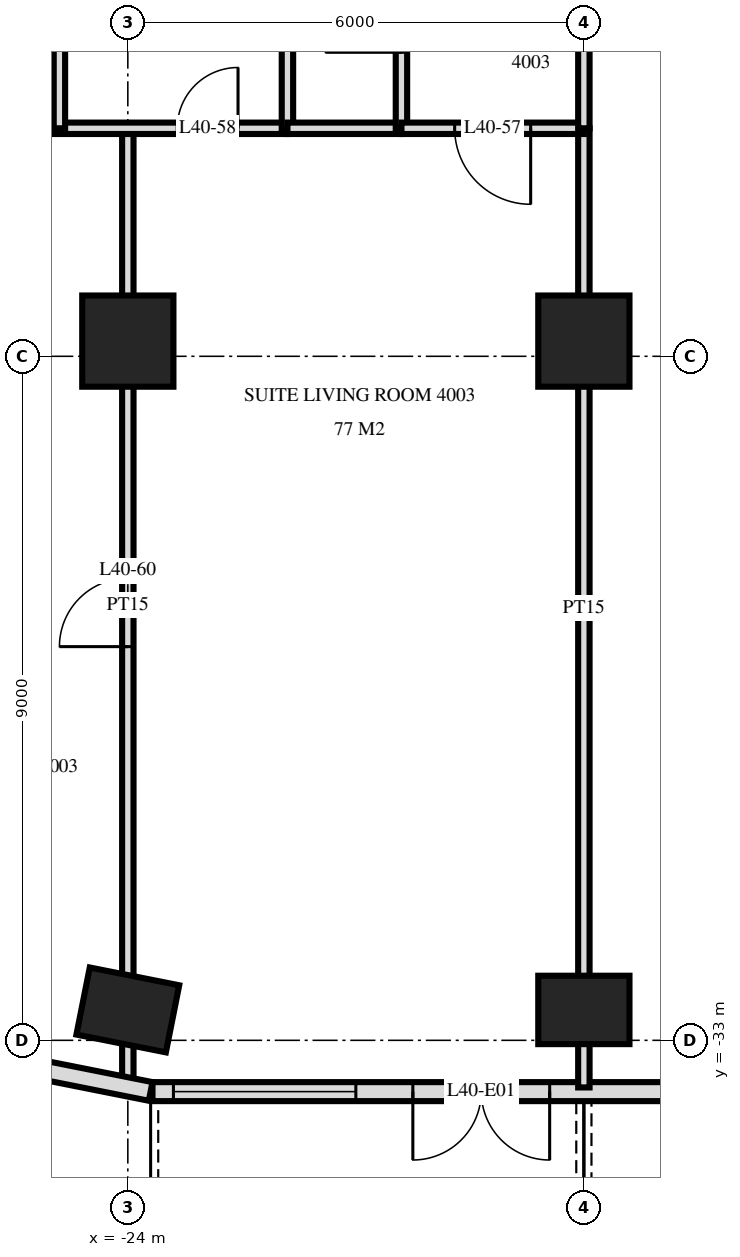
"""IFC4 building model, lengths in metres.
Left out: names, types, materials, properties, quantities, classifications, styles, units other than length and angle.
Written with IfcOpenShell. Run it as: python <this file> out.ifc"""

import sys

from ifc_helpers import new_model, si_unit, direction, frame, frame_2d, origin, origin_2d, place, context, subcontext, project, spatial, rectangle, extrude, element, fill, save


model = new_model("IFC4")
c1 = context("Model", 3, precision=1e-05, world=origin(), true_north=direction((0.0, 1.0)))
c2 = subcontext(c1, "Body", "Model", "MODEL_VIEW")
j1 = project(units=[si_unit("LENGTHUNIT", "METRE"), si_unit("PLANEANGLEUNIT", "RADIAN")], contexts=[c1])
p1 = place(None, origin())
s1 = spatial("IfcSite", under=j1, at=p1, CompositionType="ELEMENT")
p2 = place(p1, origin())
s2 = spatial("IfcBuilding", under=s1, at=p2, CompositionType="ELEMENT")
p3 = place(p2, frame((0.0, 0.0, 156.0)))
s3 = spatial("IfcBuildingStorey", under=s2, at=p3, CompositionType="ELEMENT", Elevation=156.0)
p4 = place(p3, frame((-24.0, -32.6, 0.0), z_axis=(0.0, 0.0, 1.0), x_axis=(-0.980792089743, 0.195056086032, 0.0)))
e1 = element("IfcColumn", 1, at=p4, inside=s3, PredefinedType="COLUMN", context=c2, shape_type="SweptSolid", body=[
    extrude(rectangle(XDim=1.2, YDim=0.9, at=origin_2d()), origin(), (0.0, 0.0, 1.0), 3.6),
])
p5 = place(p3, frame((-24.0, -23.8, 0.0), z_axis=(0.0, 0.0, 1.0), x_axis=(1.0, 0.0, 0.0)))
e2 = element("IfcColumn", 2, at=p5, inside=s3, PredefinedType="COLUMN", context=c2, shape_type="SweptSolid", body=[
    extrude(rectangle(XDim=1.2, YDim=1.2, at=origin_2d()), origin(), (0.0, 0.0, 1.0), 3.6),
])
p6 = place(p3, frame((-18.0, -32.6, 0.0), z_axis=(0.0, 0.0, 1.0), x_axis=(1.0, 0.0, 0.0)))
e3 = element("IfcColumn", 3, at=p6, inside=s3, PredefinedType="COLUMN", context=c2, shape_type="SweptSolid", body=[
    extrude(rectangle(XDim=1.2, YDim=0.9, at=origin_2d()), origin(), (0.0, 0.0, 1.0), 3.6),
])
p7 = place(p3, frame((-18.0, -23.8, 0.0), z_axis=(0.0, 0.0, 1.0), x_axis=(1.0, 0.0, 0.0)))
e4 = element("IfcColumn", 4, at=p7, inside=s3, PredefinedType="COLUMN", context=c2, shape_type="SweptSolid", body=[
    extrude(rectangle(XDim=1.2, YDim=1.2, at=origin_2d()), origin(), (0.0, 0.0, 1.0), 3.6),
])
p8 = place(p3, frame((-25.349, -33.344, 0.0), z_axis=(0.0, 0.0, 1.0), x_axis=(0.980775640221, -0.19513878023, 0.0)))
e5 = element("IfcWall", 5, at=p8, inside=s3, PredefinedType="SOLIDWALL", context=c2, shape_type="SweptSolid", body=[
    extrude(rectangle(XDim=1.681, YDim=0.25, at=frame_2d((0.841, 0.0))), origin(), (0.0, 0.0, 1.0), 3.32),
])
p9 = place(p3, frame((-23.675, -33.675, 0.0), z_axis=(0.0, 0.0, 1.0), x_axis=(1.0, 0.0, 0.0)))
e6 = element("IfcWall", 6, at=p9, inside=s3, PredefinedType="SOLIDWALL", context=c2, shape_type="SweptSolid", body=[
    extrude(rectangle(XDim=47.351, YDim=0.25, at=frame_2d((23.675, 0.0))), origin(), (0.0, 0.0, 1.0), 3.32),
])
p10 = place(p9, frame((0.275, 0.0, 0.3)))
e7 = element("IfcOpeningElement", 7, at=p10, cuts=e6, PredefinedType="OPENING", context=c2, shape_type="SweptSolid", body=[
    extrude(rectangle(XDim=2.4, YDim=2.1, at=frame_2d((1.2, 1.05))), frame((0.0, 0.135, 0.0), z_axis=(0.0, -1.0, 0.0), x_axis=(1.0, 0.0, 0.0)), (0.0, 0.0, 1.0), 0.27),
])
p11 = place(p9, frame((3.425, 0.0, 0.0)))
e8 = element("IfcOpeningElement", 8, at=p11, cuts=e6, PredefinedType="OPENING", context=c2, shape_type="SweptSolid", body=[
    extrude(rectangle(XDim=1.8, YDim=2.4, at=frame_2d((0.9, 1.2))), frame((0.0, 0.135, 0.0), z_axis=(0.0, -1.0, 0.0), x_axis=(1.0, 0.0, 0.0)), (0.0, 0.0, 1.0), 0.27),
])
p12 = place(p9, frame((7.775, 0.0, 0.0)))
e9 = element("IfcOpeningElement", 9, at=p12, cuts=e6, PredefinedType="OPENING", context=c2, shape_type="SweptSolid", body=[
    extrude(rectangle(XDim=1.8, YDim=2.4, at=frame_2d((0.9, 1.2))), frame((0.0, 0.135, 0.0), z_axis=(0.0, -1.0, 0.0), x_axis=(1.0, 0.0, 0.0)), (0.0, 0.0, 1.0), 0.27),
])
p13 = place(p9, frame((12.275, 0.0, 0.0)))
e10 = element("IfcOpeningElement", 10, at=p13, cuts=e6, PredefinedType="OPENING", context=c2, shape_type="SweptSolid", body=[
    extrude(rectangle(XDim=1.8, YDim=2.4, at=frame_2d((0.9, 1.2))), frame((0.0, 0.135, 0.0), z_axis=(0.0, -1.0, 0.0), x_axis=(1.0, 0.0, 0.0)), (0.0, 0.0, 1.0), 0.27),
])
p14 = place(p9, frame((14.975, 0.0, 0.3)))
e11 = element("IfcOpeningElement", 11, at=p14, cuts=e6, PredefinedType="OPENING", context=c2, shape_type="SweptSolid", body=[
    extrude(rectangle(XDim=2.4, YDim=2.1, at=frame_2d((1.2, 1.05))), frame((0.0, 0.135, 0.0), z_axis=(0.0, -1.0, 0.0), x_axis=(1.0, 0.0, 0.0)), (0.0, 0.0, 1.0), 0.27),
])
p15 = place(p9, frame((17.975, 0.0, 0.3)))
e12 = element("IfcOpeningElement", 12, at=p15, cuts=e6, PredefinedType="OPENING", context=c2, shape_type="SweptSolid", body=[
    extrude(rectangle(XDim=2.4, YDim=2.1, at=frame_2d((1.2, 1.05))), frame((0.0, 0.135, 0.0), z_axis=(0.0, -1.0, 0.0), x_axis=(1.0, 0.0, 0.0)), (0.0, 0.0, 1.0), 0.27),
])
p16 = place(p9, frame((21.275, 0.0, 0.0)))
e13 = element("IfcOpeningElement", 13, at=p16, cuts=e6, PredefinedType="OPENING", context=c2, shape_type="SweptSolid", body=[
    extrude(rectangle(XDim=1.8, YDim=2.4, at=frame_2d((0.9, 1.2))), frame((0.0, 0.135, 0.0), z_axis=(0.0, -1.0, 0.0), x_axis=(1.0, 0.0, 0.0)), (0.0, 0.0, 1.0), 0.27),
])
p17 = place(p9, frame((24.275, 0.0, 0.0)))
e14 = element("IfcOpeningElement", 14, at=p17, cuts=e6, PredefinedType="OPENING", context=c2, shape_type="SweptSolid", body=[
    extrude(rectangle(XDim=1.8, YDim=2.4, at=frame_2d((0.9, 1.2))), frame((0.0, 0.135, 0.0), z_axis=(0.0, -1.0, 0.0), x_axis=(1.0, 0.0, 0.0)), (0.0, 0.0, 1.0), 0.27),
])
p18 = place(p9, frame((26.975, 0.0, 0.3)))
e15 = element("IfcOpeningElement", 15, at=p18, cuts=e6, PredefinedType="OPENING", context=c2, shape_type="SweptSolid", body=[
    extrude(rectangle(XDim=2.4, YDim=2.1, at=frame_2d((1.2, 1.05))), frame((0.0, 0.135, 0.0), z_axis=(0.0, -1.0, 0.0), x_axis=(1.0, 0.0, 0.0)), (0.0, 0.0, 1.0), 0.27),
])
p19 = place(p9, frame((30.275, 0.0, 0.0)))
e16 = element("IfcOpeningElement", 16, at=p19, cuts=e6, PredefinedType="OPENING", context=c2, shape_type="SweptSolid", body=[
    extrude(rectangle(XDim=1.8, YDim=2.4, at=frame_2d((0.9, 1.2))), frame((0.0, 0.135, 0.0), z_axis=(0.0, -1.0, 0.0), x_axis=(1.0, 0.0, 0.0)), (0.0, 0.0, 1.0), 0.27),
])
p20 = place(p9, frame((32.975, 0.0, 0.3)))
e17 = element("IfcOpeningElement", 17, at=p20, cuts=e6, PredefinedType="OPENING", context=c2, shape_type="SweptSolid", body=[
    extrude(rectangle(XDim=2.4, YDim=2.1, at=frame_2d((1.2, 1.05))), frame((0.0, 0.135, 0.0), z_axis=(0.0, -1.0, 0.0), x_axis=(1.0, 0.0, 0.0)), (0.0, 0.0, 1.0), 0.27),
])
p21 = place(p9, frame((36.275, 0.0, 0.0)))
e18 = element("IfcOpeningElement", 18, at=p21, cuts=e6, PredefinedType="OPENING", context=c2, shape_type="SweptSolid", body=[
    extrude(rectangle(XDim=1.8, YDim=2.4, at=frame_2d((0.9, 1.2))), frame((0.0, 0.135, 0.0), z_axis=(0.0, -1.0, 0.0), x_axis=(1.0, 0.0, 0.0)), (0.0, 0.0, 1.0), 0.27),
])
p22 = place(p9, frame((38.975, 0.0, 0.3)))
e19 = element("IfcOpeningElement", 19, at=p22, cuts=e6, PredefinedType="OPENING", context=c2, shape_type="SweptSolid", body=[
    extrude(rectangle(XDim=2.4, YDim=2.1, at=frame_2d((1.2, 1.05))), frame((0.0, 0.135, 0.0), z_axis=(0.0, -1.0, 0.0), x_axis=(1.0, 0.0, 0.0)), (0.0, 0.0, 1.0), 0.27),
])
p23 = place(p9, frame((41.975, 0.0, 0.3)))
e20 = element("IfcOpeningElement", 20, at=p23, cuts=e6, PredefinedType="OPENING", context=c2, shape_type="SweptSolid", body=[
    extrude(rectangle(XDim=2.4, YDim=2.1, at=frame_2d((1.2, 1.05))), frame((0.0, 0.135, 0.0), z_axis=(0.0, -1.0, 0.0), x_axis=(1.0, 0.0, 0.0)), (0.0, 0.0, 1.0), 0.27),
])
p24 = place(p9, frame((45.125, 0.0, 0.0)))
e21 = element("IfcOpeningElement", 21, at=p24, cuts=e6, PredefinedType="OPENING", context=c2, shape_type="SweptSolid", body=[
    extrude(rectangle(XDim=1.8, YDim=2.4, at=frame_2d((0.9, 1.2))), frame((0.0, 0.135, 0.0), z_axis=(0.0, -1.0, 0.0), x_axis=(1.0, 0.0, 0.0)), (0.0, 0.0, 1.0), 0.27),
])
p25 = place(p3, frame((-18.0, -21.0, 0.0), z_axis=(0.0, 0.0, 1.0), x_axis=(0.0, 1.0, 0.0)))
e22 = element("IfcWall", 22, at=p25, inside=s3, PredefinedType="PARTITIONING", context=c2, shape_type="SweptSolid", body=[
    extrude(rectangle(XDim=3.0, YDim=0.15, at=frame_2d((1.5, 0.0))), origin(), (0.0, 0.0, 1.0), 3.32),
])
p26 = place(p3, frame((-18.0, -33.62, 0.0), z_axis=(0.0, 0.0, 1.0), x_axis=(0.0, 1.0, 0.0)))
e23 = element("IfcWall", 23, at=p26, inside=s3, PredefinedType="PARTITIONING", context=c2, shape_type="SweptSolid", body=[
    extrude(rectangle(XDim=12.62, YDim=0.15, at=frame_2d((6.31, 0.0))), origin(), (0.0, 0.0, 1.0), 3.32),
])
p27 = place(p3, frame((-20.4, -21.0, 0.0), z_axis=(0.0, 0.0, 1.0), x_axis=(0.0, 1.0, 0.0)))
e24 = element("IfcWall", 24, at=p27, inside=s3, PredefinedType="PARTITIONING", context=c2, shape_type="SweptSolid", body=[
    extrude(rectangle(XDim=3.0, YDim=0.15, at=frame_2d((1.5, 0.0))), origin(), (0.0, 0.0, 1.0), 3.32),
])
p28 = place(p27, frame((1.0, 0.0, 0.0)))
e25 = element("IfcOpeningElement", 25, at=p28, cuts=e24, PredefinedType="OPENING", context=c2, shape_type="SweptSolid", body=[
    extrude(rectangle(XDim=1.0, YDim=2.1, at=frame_2d((0.5, 1.05))), frame((0.0, 0.085, 0.0), z_axis=(0.0, -1.0, 0.0), x_axis=(1.0, 0.0, 0.0)), (0.0, 0.0, 1.0), 0.17),
])
p29 = place(p3, frame((-21.9, -21.0, 0.0), z_axis=(0.0, 0.0, 1.0), x_axis=(0.0, 1.0, 0.0)))
e26 = element("IfcWall", 26, at=p29, inside=s3, PredefinedType="PLUMBINGWALL", context=c2, shape_type="SweptSolid", body=[
    extrude(rectangle(XDim=3.0, YDim=0.15, at=frame_2d((1.5, 0.0))), origin(), (0.0, 0.0, 1.0), 3.32),
])
p30 = place(p3, frame((-24.0, -33.557, 0.0), z_axis=(0.0, 0.0, 1.0), x_axis=(0.0, 1.0, 0.0)))
e27 = element("IfcWall", 27, at=p30, inside=s3, PredefinedType="PARTITIONING", context=c2, shape_type="SweptSolid", body=[
    extrude(rectangle(XDim=12.557, YDim=0.15, at=frame_2d((6.278, 0.0))), origin(), (0.0, 0.0, 1.0), 3.32),
])
p31 = place(p30, frame((5.737, 0.0, 0.0)))
e28 = element("IfcOpeningElement", 28, at=p31, cuts=e27, PredefinedType="OPENING", context=c2, shape_type="SweptSolid", body=[
    extrude(rectangle(XDim=0.9, YDim=2.1, at=frame_2d((0.45, 1.05))), frame((0.0, 0.085, 0.0), z_axis=(0.0, -1.0, 0.0), x_axis=(1.0, 0.0, 0.0)), (0.0, 0.0, 1.0), 0.17),
])
p32 = place(p3, frame((-24.9, -21.0, 0.0), z_axis=(0.0, 0.0, 1.0), x_axis=(0.0, 1.0, 0.0)))
e29 = element("IfcWall", 29, at=p32, inside=s3, PredefinedType="PARTITIONING", context=c2, shape_type="SweptSolid", body=[
    extrude(rectangle(XDim=3.0, YDim=0.15, at=frame_2d((1.5, 0.0))), origin(), (0.0, 0.0, 1.0), 3.32),
])
p33 = place(p3, frame((-20.4, -21.0, 0.0), z_axis=(0.0, 0.0, 1.0), x_axis=(1.0, 0.0, 0.0)))
e30 = element("IfcWall", 30, at=p33, inside=s3, PredefinedType="PARTITIONING", context=c2, shape_type="SweptSolid", body=[
    extrude(rectangle(XDim=2.4, YDim=0.15, at=frame_2d((1.2, 0.0))), origin(), (0.0, 0.0, 1.0), 3.32),
])
p34 = place(p33, frame((0.7, 0.0, 0.0)))
e31 = element("IfcOpeningElement", 31, at=p34, cuts=e30, PredefinedType="OPENING", context=c2, shape_type="SweptSolid", body=[
    extrude(rectangle(XDim=1.0, YDim=2.1, at=frame_2d((0.5, 1.05))), frame((0.0, 0.085, 0.0), z_axis=(0.0, -1.0, 0.0), x_axis=(1.0, 0.0, 0.0)), (0.0, 0.0, 1.0), 0.17),
])
p35 = place(p3, frame((-28.02, -21.0, 0.0), z_axis=(0.0, 0.0, 1.0), x_axis=(1.0, 0.0, 0.0)))
e32 = element("IfcWall", 32, at=p35, inside=s3, PredefinedType="PARTITIONING", context=c2, shape_type="SweptSolid", body=[
    extrude(rectangle(XDim=6.12, YDim=0.15, at=frame_2d((3.06, 0.0))), origin(), (0.0, 0.0, 1.0), 3.32),
])
p36 = place(p35, frame((4.67, 0.0, 0.0)))
e33 = element("IfcOpeningElement", 33, at=p36, cuts=e32, PredefinedType="OPENING", context=c2, shape_type="SweptSolid", body=[
    extrude(rectangle(XDim=0.8, YDim=2.1, at=frame_2d((0.4, 1.05))), frame((0.0, 0.085, 0.0), z_axis=(0.0, -1.0, 0.0), x_axis=(1.0, 0.0, 0.0)), (0.0, 0.0, 1.0), 0.17),
])
p37 = place(p35, frame((1.02, 0.0, 0.0)))
e34 = element("IfcOpeningElement", 34, at=p37, cuts=e32, PredefinedType="OPENING", context=c2, shape_type="SweptSolid", body=[
    extrude(rectangle(XDim=0.9, YDim=2.1, at=frame_2d((0.45, 1.05))), frame((0.0, 0.085, 0.0), z_axis=(0.0, -1.0, 0.0), x_axis=(1.0, 0.0, 0.0)), (0.0, 0.0, 1.0), 0.17),
])
p38 = place(p3, frame((-21.9, -21.0, 0.0), z_axis=(0.0, 0.0, 1.0), x_axis=(1.0, 0.0, 0.0)))
e35 = element("IfcWall", 35, at=p38, inside=s3, PredefinedType="PLUMBINGWALL", context=c2, shape_type="SweptSolid", body=[
    extrude(rectangle(XDim=1.5, YDim=0.15, at=frame_2d((0.75, 0.0))), origin(), (0.0, 0.0, 1.0), 3.32),
])
p39 = place(p10, origin())
e36 = element("IfcWindow", 36, at=p39, inside=s3, PartitioningType="SINGLE_PANEL", PredefinedType="WINDOW", context=c2, shape_type="SweptSolid", body=[
    extrude(rectangle(XDim=2.4, YDim=2.1, at=frame_2d((1.2, 1.05))), frame((0.0, 0.03, 0.0), z_axis=(0.0, -1.0, 0.0), x_axis=(1.0, 0.0, 0.0)), (0.0, 0.0, 1.0), 0.06),
])
fill(e7, e36)
p40 = place(p11, frame((0.9, 0.0, 0.0), z_axis=(0.0, 0.0, 1.0), x_axis=(-1.0, 0.0, 0.0)))
e37 = element("IfcDoor", 37, at=p40, inside=s3, OperationType="DOUBLE_DOOR_SINGLE_SWING", PredefinedType="DOOR", context=c2, shape_type="SweptSolid", body=[
    extrude(rectangle(XDim=1.8, YDim=2.4, at=frame_2d((0.0, 1.2))), frame((0.0, -0.025, 0.0), z_axis=(0.0, 1.0, 0.0), x_axis=(-1.0, 0.0, 0.0)), (0.0, 0.0, 1.0), 0.05),
])
fill(e8, e37)
p41 = place(p34, frame((0.5, 0.0, 0.0), z_axis=(0.0, 0.0, 1.0), x_axis=(-1.0, 0.0, 0.0)))
e38 = element("IfcDoor", 38, at=p41, inside=s3, OperationType="SINGLE_SWING_RIGHT", PredefinedType="DOOR", context=c2, shape_type="SweptSolid", body=[
    extrude(rectangle(XDim=1.0, YDim=2.1, at=frame_2d((0.0, 1.05))), frame((0.0, -0.025, 0.0), z_axis=(0.0, 1.0, 0.0), x_axis=(-1.0, 0.0, 0.0)), (0.0, 0.0, 1.0), 0.05),
])
fill(e31, e38)
p42 = place(p36, origin())
e39 = element("IfcDoor", 39, at=p42, inside=s3, OperationType="SINGLE_SWING_LEFT", PredefinedType="DOOR", context=c2, shape_type="SweptSolid", body=[
    extrude(rectangle(XDim=0.8, YDim=2.1, at=frame_2d((0.4, 1.05))), frame((0.0, 0.025, 0.0), z_axis=(0.0, -1.0, 0.0), x_axis=(1.0, 0.0, 0.0)), (0.0, 0.0, 1.0), 0.05),
])
fill(e33, e39)
p43 = place(p31, origin())
e40 = element("IfcDoor", 40, at=p43, inside=s3, OperationType="SINGLE_SWING_RIGHT", PredefinedType="DOOR", context=c2, shape_type="SweptSolid", body=[
    extrude(rectangle(XDim=0.9, YDim=2.1, at=frame_2d((0.45, 1.05))), frame((0.0, 0.025, 0.0), z_axis=(0.0, -1.0, 0.0), x_axis=(1.0, 0.0, 0.0)), (0.0, 0.0, 1.0), 0.05),
])
fill(e28, e40)
save(model, sys.argv[1])
